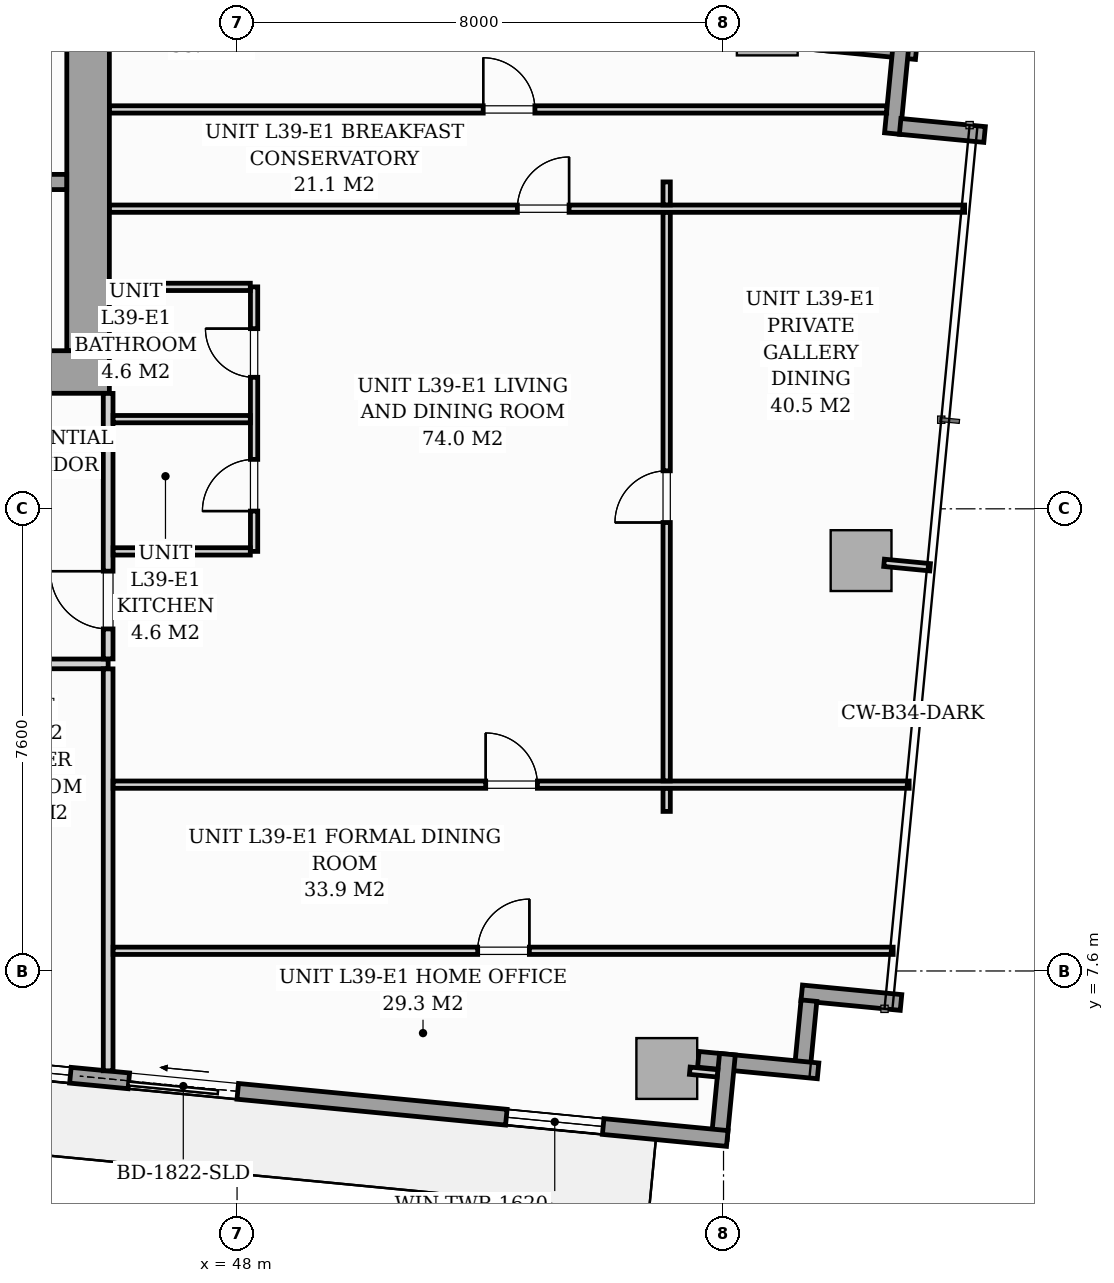
"""IFC4 building model, lengths in metres.
Left out: names, types, materials, properties, quantities, classifications, styles, units other than length and angle.
Written with IfcOpenShell. Run it as: python <this file> out.ifc"""

import sys

from ifc_helpers import new_model, si_unit, direction, frame, frame_2d, origin, origin_2d, place, context, subcontext, project, spatial, rectangle, i_section, extrude, source, transform, mapped, element, fill, save


model = new_model("IFC4")
c1 = context("Model", 3, precision=1e-05, world=origin(), true_north=direction((0.0, 1.0)))
c2 = subcontext(c1, "Body", "Model", "MODEL_VIEW")
j1 = project(units=[si_unit("LENGTHUNIT", "METRE"), si_unit("PLANEANGLEUNIT", "RADIAN")], contexts=[c1])
p1 = place(None, origin())
s1 = spatial("IfcSite", under=j1, at=p1, CompositionType="ELEMENT")
p2 = place(p1, origin())
s2 = spatial("IfcBuilding", under=s1, at=p2, CompositionType="ELEMENT")
p3 = place(p2, frame((0.0, 0.0, 137.4)))
s3 = spatial("IfcBuildingStorey", under=s2, at=p3, CompositionType="ELEMENT", Elevation=137.4)
m1 = source(origin(), c2, "Body", "SweptSolid", [
    extrude(i_section(OverallWidth=0.421, OverallDepth=0.465, WebThickness=0.045, FlangeThickness=0.073, FilletRadius=0.018, at=origin_2d()), origin(), (0.0, 0.0, 1.0), 3.196),
])
p4 = place(p3, frame((45.6, 17.4, 0.002), z_axis=(0.0, 0.0, 1.0), x_axis=(1.0, 0.0, 0.0)))
e1 = element("IfcColumn", 1, at=p4, inside=s3, PredefinedType="PILASTER", context=c2, shape_type="MappedRepresentation", body=[
    mapped(m1, transform((0.0, 0.0, 0.0), scale=1.0)),
])
m2 = source(origin(), c2, "Body", "SweptSolid", [
    extrude(rectangle(XDim=1.0, YDim=1.0, at=origin_2d()), origin(), (0.0, 0.0, 1.0), 3.196),
])
for number, where, z_axis, x_axis in (
    (2, (55.067, 5.996, 0.002), (0.0, 0.0, 1.0), (0.995, -0.096, 0.0)),
    (3, (56.719, 23.157, 0.002), (0.0, 0.0, 1.0), (0.995, -0.096, 0.0)),
    (4, (58.262, 14.348, 0.002), (0.0, 0.0, 1.0), (0.995, -0.096, 0.0)),
):
    element("IfcColumn", number, at=place(p3, frame(where, z_axis=z_axis, x_axis=x_axis)), inside=s3, PredefinedType="COLUMN", context=c2, shape_type="MappedRepresentation", body=[
        mapped(m2, transform((0.0, 0.0, 0.0), scale=1.0)),
    ])
p5 = place(p3, frame((57.2, 22.909, 0.0), z_axis=(0.0, 0.0, 1.0), x_axis=(0.995401789159, -0.095787672171, 0.0)))
e5 = element("IfcWall", 5, at=p5, inside=s3, PredefinedType="STANDARD", context=c2, shape_type="SweptSolid", body=[
    extrude(rectangle(XDim=1.978, YDim=0.26, at=frame_2d((0.989, 0.0))), origin(), (0.0, 0.0, 1.0), 2.94),
])
for number, where, z_axis, x_axis in (
    (6, (58.912, 22.76, 0.0), (0.0, 0.0, 1.0), (-0.096, -0.995, 0.0)),
    (7, (58.905, 21.49, 0.0), (0.0, 0.0, 1.0), (0.995, -0.096, 0.0)),
):
    element("IfcWall", number, at=place(p3, frame(where, z_axis=z_axis, x_axis=x_axis)), inside=s3, PredefinedType="STANDARD", context=c2, shape_type="SweptSolid", body=[
        extrude(rectangle(XDim=1.395, YDim=0.26, at=frame_2d((0.698, 0.0))), origin(), (0.0, 0.0, 1.0), 2.94),
    ])
p6 = place(p3, frame((58.919, 7.082, 0.0), z_axis=(0.0, 0.0, 1.0), x_axis=(-0.995393194909, 0.095876939504, 0.0)))
e8 = element("IfcWall", 8, at=p6, inside=s3, PredefinedType="STANDARD", context=c2, shape_type="SweptSolid", body=[
    extrude(rectangle(XDim=1.64, YDim=0.26, at=frame_2d((0.82, 0.0))), origin(), (0.0, 0.0, 1.0), 2.94),
])
p7 = place(p3, frame((57.405, 7.112, 0.0), z_axis=(0.0, 0.0, 1.0), x_axis=(-0.095971333708, -0.995384098279, 0.0)))
e9 = element("IfcWall", 9, at=p7, inside=s3, PredefinedType="STANDARD", context=c2, shape_type="SweptSolid", body=[
    extrude(rectangle(XDim=1.15, YDim=0.26, at=frame_2d((0.575, 0.0))), origin(), (0.0, 0.0, 1.0), 2.94),
])
p8 = place(p3, frame((57.555, 5.958, 0.0), z_axis=(0.0, 0.0, 1.0), x_axis=(-0.995401789159, 0.095787672171, 0.0)))
e10 = element("IfcWall", 10, at=p8, inside=s3, PredefinedType="STANDARD", context=c2, shape_type="SweptSolid", body=[
    extrude(rectangle(XDim=1.978, YDim=0.26, at=frame_2d((0.989, 0.0))), origin(), (0.0, 0.0, 1.0), 2.94),
])
p9 = place(p3, frame((56.064, 6.232, 0.0), z_axis=(0.0, 0.0, 1.0), x_axis=(-0.09589913835, -0.995391056452, 0.0)))
e11 = element("IfcWall", 11, at=p9, inside=s3, PredefinedType="STANDARD", context=c2, shape_type="SweptSolid", body=[
    extrude(rectangle(XDim=1.395, YDim=0.26, at=frame_2d((0.698, 0.0))), origin(), (0.0, 0.0, 1.0), 2.94),
])
p10 = place(p3, frame((56.061, 4.845, 0.0), z_axis=(0.0, 0.0, 1.0), x_axis=(-0.995395976631, 0.095848055311, 0.0)))
e12 = element("IfcWall", 12, at=p10, inside=s3, PredefinedType="STANDARD", context=c2, shape_type="SweptSolid", body=[
    extrude(rectangle(XDim=17.01, YDim=0.26, at=frame_2d((8.505, 0.0))), origin(), (0.0, 0.0, 1.0), 2.94),
])
p11 = place(p10, frame((8.087, 0.0, 0.0)))
e13 = element("IfcOpeningElement", 13, at=p11, cuts=e12, PredefinedType="OPENING", context=c2, shape_type="SweptSolid", body=[
    extrude(rectangle(XDim=1.8, YDim=2.06, at=frame_2d((0.9, 1.03))), frame((0.0, 0.14, 0.0), z_axis=(0.0, -1.0, 0.0), x_axis=(1.0, 0.0, 0.0)), (0.0, 0.0, 1.0), 0.28),
])
p12 = place(p10, frame((2.05, 0.0, 0.65)))
e14 = element("IfcOpeningElement", 14, at=p12, cuts=e12, PredefinedType="OPENING", context=c2, shape_type="SweptSolid", body=[
    extrude(rectangle(XDim=1.6, YDim=1.5, at=frame_2d((0.8, 0.75))), frame((0.0, 0.14, 0.0), z_axis=(0.0, -1.0, 0.0), x_axis=(1.0, 0.0, 0.0)), (0.0, 0.0, 1.0), 0.28),
])
p13 = place(p10, frame((10.852, 0.0, 0.75)))
e15 = element("IfcOpeningElement", 15, at=p13, cuts=e12, PredefinedType="OPENING", context=c2, shape_type="SweptSolid", body=[
    extrude(rectangle(XDim=1.6, YDim=1.5, at=frame_2d((0.8, 0.75))), frame((0.0, 0.14, 0.0), z_axis=(0.0, -1.0, 0.0), x_axis=(1.0, 0.0, 0.0)), (0.0, 0.0, 1.0), 0.28),
])
p14 = place(p3, frame((26.1, 17.45, 0.0), z_axis=(0.0, 0.0, 1.0), x_axis=(1.0, 0.0, 0.0)))
e16 = element("IfcWall", 16, at=p14, inside=s3, PredefinedType="SHEAR", context=c2, shape_type="SweptSolid", body=[
    extrude(rectangle(XDim=19.8, YDim=0.7, at=frame_2d((9.9, 0.0))), origin(), (0.0, 0.0, 1.0), 3.2),
])
p15 = place(p14, frame((1.05, 0.0, 0.0)))
e17 = element("IfcOpeningElement", 17, at=p15, cuts=e16, PredefinedType="OPENING", context=c2, shape_type="SweptSolid", body=[
    extrude(rectangle(XDim=0.95, YDim=2.06, at=frame_2d((0.475, 1.03))), frame((0.0, 0.36, 0.0), z_axis=(0.0, -1.0, 0.0), x_axis=(1.0, 0.0, 0.0)), (0.0, 0.0, 1.0), 0.72),
])
p16 = place(p14, frame((9.48, 0.0, 0.0)))
e18 = element("IfcOpeningElement", 18, at=p16, cuts=e16, PredefinedType="OPENING", context=c2, shape_type="SweptSolid", body=[
    extrude(rectangle(XDim=0.85, YDim=2.0, at=frame_2d((0.425, 1.0))), frame((0.0, 0.36, 0.0), z_axis=(0.0, -1.0, 0.0), x_axis=(1.0, 0.0, 0.0)), (0.0, 0.0, 1.0), 0.72),
])
p17 = place(p14, frame((17.65, 0.0, 0.0)))
e19 = element("IfcOpeningElement", 19, at=p17, cuts=e16, PredefinedType="OPENING", context=c2, shape_type="SweptSolid", body=[
    extrude(rectangle(XDim=0.95, YDim=2.06, at=frame_2d((0.475, 1.03))), frame((0.0, 0.36, 0.0), z_axis=(0.0, -1.0, 0.0), x_axis=(1.0, 0.0, 0.0)), (0.0, 0.0, 1.0), 0.72),
])
p18 = place(p3, frame((45.55, 17.802, 0.0), z_axis=(0.0, 0.0, 1.0), x_axis=(0.0, 1.0, 0.0)))
e20 = element("IfcWall", 20, at=p18, inside=s3, PredefinedType="SHEAR", context=c2, shape_type="SweptSolid", body=[
    extrude(rectangle(XDim=5.796, YDim=0.7, at=frame_2d((2.898, 0.0))), origin(), (0.0, 0.0, 1.0), 3.2),
])
p19 = place(p3, frame((37.05, 20.575, 0.0), z_axis=(0.0, 0.0, 1.0), x_axis=(1.0, 0.0, 0.0)))
e21 = element("IfcWall", 21, at=p19, inside=s3, PredefinedType="SOLIDWALL", context=c2, shape_type="SweptSolid", body=[
    extrude(rectangle(XDim=8.148, YDim=0.25, at=frame_2d((4.074, 0.0))), origin(), (0.0, 0.0, 1.0), 3.2),
])
p20 = place(p19, frame((6.6, 0.0, 0.0)))
e22 = element("IfcOpeningElement", 22, at=p20, cuts=e21, PredefinedType="OPENING", context=c2, shape_type="SweptSolid", body=[
    extrude(rectangle(XDim=0.95, YDim=2.06, at=frame_2d((0.475, 1.03))), frame((0.0, 0.135, 0.0), z_axis=(0.0, -1.0, 0.0), x_axis=(1.0, 0.0, 0.0)), (0.0, 0.0, 1.0), 0.27),
])
p21 = place(p3, frame((22.05, 12.65, 0.0), z_axis=(0.0, 0.0, 1.0), x_axis=(1.0, 0.0, 0.0)))
e23 = element("IfcWall", 23, at=p21, inside=s3, PredefinedType="PARTITIONING", context=c2, shape_type="SweptSolid", body=[
    extrude(rectangle(XDim=23.83, YDim=0.16, at=frame_2d((11.915, 0.0))), origin(), (0.0, 0.0, 1.0), 2.94),
])
p22 = place(p21, frame((3.0, 0.0, 0.0)))
e24 = element("IfcOpeningElement", 24, at=p22, cuts=e23, PredefinedType="OPENING", context=c2, shape_type="SweptSolid", body=[
    extrude(rectangle(XDim=0.95, YDim=2.06, at=frame_2d((0.475, 1.03))), frame((0.0, 0.09, 0.0), z_axis=(0.0, -1.0, 0.0), x_axis=(1.0, 0.0, 0.0)), (0.0, 0.0, 1.0), 0.18),
])
p23 = place(p21, frame((15.485, 0.0, 0.0)))
e25 = element("IfcOpeningElement", 25, at=p23, cuts=e23, PredefinedType="OPENING", context=c2, shape_type="SweptSolid", body=[
    extrude(rectangle(XDim=0.95, YDim=2.06, at=frame_2d((0.475, 1.03))), frame((0.0, 0.09, 0.0), z_axis=(0.0, -1.0, 0.0), x_axis=(1.0, 0.0, 0.0)), (0.0, 0.0, 1.0), 0.18),
])
p24 = place(p3, frame((45.88, 5.958, 0.0), z_axis=(0.0, 0.0, 1.0), x_axis=(0.0, 1.0, 0.0)))
e26 = element("IfcWall", 26, at=p24, inside=s3, PredefinedType="PARTITIONING", context=c2, shape_type="SweptSolid", body=[
    extrude(rectangle(XDim=6.61, YDim=0.16, at=frame_2d((3.305, 0.0))), origin(), (0.0, 0.0, 1.0), 2.94),
])
p25 = place(p3, frame((45.88, 12.732, 0.0), z_axis=(0.0, 0.0, 1.0), x_axis=(0.0, 1.0, 0.0)))
e27 = element("IfcWall", 27, at=p25, inside=s3, PredefinedType="PARTITIONING", context=c2, shape_type="SweptSolid", body=[
    extrude(rectangle(XDim=4.366, YDim=0.16, at=frame_2d((2.183, 0.0))), origin(), (0.0, 0.0, 1.0), 2.94),
])
p26 = place(p25, frame((0.493, 0.0, 0.0)))
e28 = element("IfcOpeningElement", 28, at=p26, cuts=e27, PredefinedType="OPENING", context=c2, shape_type="SweptSolid", body=[
    extrude(rectangle(XDim=0.95, YDim=2.06, at=frame_2d((0.475, 1.03))), frame((0.0, 0.09, 0.0), z_axis=(0.0, -1.0, 0.0), x_axis=(1.0, 0.0, 0.0)), (0.0, 0.0, 1.0), 0.18),
])
p27 = place(p3, frame((48.28, 14.5, 0.0), z_axis=(0.0, 0.0, 1.0), x_axis=(0.0, 1.0, 0.0)))
e29 = element("IfcWall", 29, at=p27, inside=s3, PredefinedType="PARTITIONING", context=c2, shape_type="SweptSolid", body=[
    extrude(rectangle(XDim=4.35, YDim=0.12, at=frame_2d((2.175, 0.0))), origin(), (0.0, 0.0, 1.0), 2.94),
])
p28 = place(p27, frame((0.663, 0.0, 0.0)))
e30 = element("IfcOpeningElement", 30, at=p28, cuts=e29, PredefinedType="OPENING", context=c2, shape_type="SweptSolid", body=[
    extrude(rectangle(XDim=0.85, YDim=2.05, at=frame_2d((0.425, 1.025))), frame((0.0, 0.07, 0.0), z_axis=(0.0, -1.0, 0.0), x_axis=(1.0, 0.0, 0.0)), (0.0, 0.0, 1.0), 0.14),
])
p29 = place(p27, frame((2.863, 0.0, 0.0)))
e31 = element("IfcOpeningElement", 31, at=p29, cuts=e29, PredefinedType="OPENING", context=c2, shape_type="SweptSolid", body=[
    extrude(rectangle(XDim=0.8, YDim=2.02, at=frame_2d((0.4, 1.01))), frame((0.0, 0.07, 0.0), z_axis=(0.0, -1.0, 0.0), x_axis=(1.0, 0.0, 0.0)), (0.0, 0.0, 1.0), 0.14),
])
p30 = place(p3, frame((45.962, 16.675, 0.0), z_axis=(0.0, 0.0, 1.0), x_axis=(1.0, 0.0, 0.0)))
e32 = element("IfcWall", 32, at=p30, inside=s3, PredefinedType="PARTITIONING", context=c2, shape_type="SweptSolid", body=[
    extrude(rectangle(XDim=2.256, YDim=0.12, at=frame_2d((1.128, 0.0))), origin(), (0.0, 0.0, 1.0), 2.063),
])
p31 = place(p3, frame((45.962, 14.5, 0.0), z_axis=(0.0, 0.0, 1.0), x_axis=(1.0, 0.0, 0.0)))
e33 = element("IfcWall", 33, at=p31, inside=s3, PredefinedType="PARTITIONING", context=c2, shape_type="SweptSolid", body=[
    extrude(rectangle(XDim=2.256, YDim=0.12, at=frame_2d((1.128, 0.0))), origin(), (0.0, 0.0, 1.0), 2.94),
])
p32 = place(p3, frame((45.902, 18.85, 0.0), z_axis=(0.0, 0.0, 1.0), x_axis=(1.0, 0.0, 0.0)))
e34 = element("IfcWall", 34, at=p32, inside=s3, PredefinedType="PARTITIONING", context=c2, shape_type="SweptSolid", body=[
    extrude(rectangle(XDim=2.316, YDim=0.12, at=frame_2d((1.158, 0.0))), origin(), (0.0, 0.0, 1.0), 2.94),
])
p33 = place(p3, frame((45.902, 21.768, 0.0), z_axis=(0.0, 0.0, 1.0), x_axis=(1.0, 0.0, 0.0)))
e35 = element("IfcWall", 35, at=p33, inside=s3, PredefinedType="PARTITIONING", context=c2, shape_type="SweptSolid", body=[
    extrude(rectangle(XDim=12.781, YDim=0.12, at=frame_2d((6.391, 0.0))), origin(), (0.0, 0.0, 1.0), 2.94),
])
p34 = place(p33, frame((6.146, 0.0, 0.0)))
e36 = element("IfcOpeningElement", 36, at=p34, cuts=e35, PredefinedType="OPENING", context=c2, shape_type="SweptSolid", body=[
    extrude(rectangle(XDim=0.85, YDim=2.05, at=frame_2d((0.425, 1.025))), frame((0.0, 0.07, 0.0), z_axis=(0.0, -1.0, 0.0), x_axis=(1.0, 0.0, 0.0)), (0.0, 0.0, 1.0), 0.14),
])
p35 = place(p3, frame((45.962, 7.932, 0.0), z_axis=(0.0, 0.0, 1.0), x_axis=(1.0, 0.0, 0.0)))
e37 = element("IfcWall", 37, at=p35, inside=s3, PredefinedType="PARTITIONING", context=c2, shape_type="SweptSolid", body=[
    extrude(rectangle(XDim=12.828, YDim=0.12, at=frame_2d((6.414, 0.0))), origin(), (0.0, 0.0, 1.0), 2.94),
])
p36 = place(p35, frame((5.995, 0.0, 0.0)))
e38 = element("IfcOpeningElement", 38, at=p36, cuts=e37, PredefinedType="OPENING", context=c2, shape_type="SweptSolid", body=[
    extrude(rectangle(XDim=0.85, YDim=2.05, at=frame_2d((0.425, 1.025))), frame((0.0, 0.07, 0.0), z_axis=(0.0, -1.0, 0.0), x_axis=(1.0, 0.0, 0.0)), (0.0, 0.0, 1.0), 0.14),
])
p37 = place(p3, frame((45.962, 10.664, 0.0), z_axis=(0.0, 0.0, 1.0), x_axis=(1.0, 0.0, 0.0)))
e39 = element("IfcWall", 39, at=p37, inside=s3, PredefinedType="PARTITIONING", context=c2, shape_type="SweptSolid", body=[
    extrude(rectangle(XDim=13.091, YDim=0.12, at=frame_2d((6.545, 0.0))), origin(), (0.0, 0.0, 1.0), 2.94),
])
p38 = place(p37, frame((6.127, 0.0, 0.0)))
e40 = element("IfcOpeningElement", 40, at=p38, cuts=e39, PredefinedType="OPENING", context=c2, shape_type="SweptSolid", body=[
    extrude(rectangle(XDim=0.85, YDim=2.05, at=frame_2d((0.425, 1.025))), frame((0.0, 0.07, 0.0), z_axis=(0.0, -1.0, 0.0), x_axis=(1.0, 0.0, 0.0)), (0.0, 0.0, 1.0), 0.14),
])
p39 = place(p3, frame((45.902, 20.136, 0.0), z_axis=(0.0, 0.0, 1.0), x_axis=(1.0, 0.0, 0.0)))
e41 = element("IfcWall", 41, at=p39, inside=s3, PredefinedType="PARTITIONING", context=c2, shape_type="SweptSolid", body=[
    extrude(rectangle(XDim=14.063, YDim=0.12, at=frame_2d((7.031, 0.0))), origin(), (0.0, 0.0, 1.0), 2.94),
])
p40 = place(p39, frame((6.708, 0.0, 0.0)))
e42 = element("IfcOpeningElement", 42, at=p40, cuts=e41, PredefinedType="OPENING", context=c2, shape_type="SweptSolid", body=[
    extrude(rectangle(XDim=0.85, YDim=2.05, at=frame_2d((0.425, 1.025))), frame((0.0, 0.07, 0.0), z_axis=(0.0, -1.0, 0.0), x_axis=(1.0, 0.0, 0.0)), (0.0, 0.0, 1.0), 0.14),
])
p41 = place(p3, frame((55.065, 10.224, 0.0), z_axis=(0.0, 0.0, 1.0), x_axis=(0.0, 1.0, 0.0)))
e43 = element("IfcWall", 43, at=p41, inside=s3, PredefinedType="PARTITIONING", context=c2, shape_type="SweptSolid", body=[
    extrude(rectangle(XDim=0.378, YDim=0.12, at=frame_2d((0.189, 0.0))), origin(), (0.0, 0.0, 1.0), 2.94),
])
p42 = place(p3, frame((55.065, 10.726, 0.0), z_axis=(0.0, 0.0, 1.0), x_axis=(0.0, 1.0, 0.0)))
e44 = element("IfcWall", 44, at=p42, inside=s3, PredefinedType="PARTITIONING", context=c2, shape_type="SweptSolid", body=[
    extrude(rectangle(XDim=9.348, YDim=0.12, at=frame_2d((4.674, 0.0))), origin(), (0.0, 0.0, 1.0), 2.94),
])
p43 = place(p42, frame((4.249, 0.0, 0.0)))
e45 = element("IfcOpeningElement", 45, at=p43, cuts=e44, PredefinedType="OPENING", context=c2, shape_type="SweptSolid", body=[
    extrude(rectangle(XDim=0.85, YDim=2.05, at=frame_2d((0.425, 1.025))), frame((0.0, 0.07, 0.0), z_axis=(0.0, -1.0, 0.0), x_axis=(1.0, 0.0, 0.0)), (0.0, 0.0, 1.0), 0.14),
])
p44 = place(p3, frame((55.065, 20.198, 0.0), z_axis=(0.0, 0.0, 1.0), x_axis=(0.0, 1.0, 0.0)))
e46 = element("IfcWall", 46, at=p44, inside=s3, PredefinedType="PARTITIONING", context=c2, shape_type="SweptSolid", body=[
    extrude(rectangle(XDim=0.378, YDim=0.12, at=frame_2d((0.189, 0.0))), origin(), (0.0, 0.0, 1.0), 2.94),
])
p45 = place(p3, frame((55.445, 5.96, 0.0), z_axis=(0.0, 0.0, 1.0), x_axis=(0.995384576284, -0.09596637586, 0.0)))
e47 = element("IfcWall", 47, at=p45, inside=s3, PredefinedType="PARTITIONING", context=c2, shape_type="SweptSolid", body=[
    extrude(rectangle(XDim=0.458, YDim=0.12, at=frame_2d((0.229, 0.0))), origin(), (0.0, 0.0, 1.0), 2.94),
])
p46 = place(p3, frame((58.64, 14.312, 0.0), z_axis=(0.0, 0.0, 1.0), x_axis=(0.995377786728, -0.096036772582, 0.0)))
e48 = element("IfcWall", 48, at=p46, inside=s3, PredefinedType="PARTITIONING", context=c2, shape_type="SweptSolid", body=[
    extrude(rectangle(XDim=0.76, YDim=0.12, at=frame_2d((0.38, 0.0))), origin(), (0.0, 0.0, 1.0), 2.94),
])
m3 = source(origin(), c2, "Body", "SweptSolid", [
    extrude(rectangle(XDim=1.8, YDim=2.06, at=frame_2d((0.9, 1.03))), frame((0.0, 0.025, 0.0), z_axis=(0.0, -1.0, 0.0), x_axis=(1.0, 0.0, 0.0)), (0.0, 0.0, 1.0), 0.05),
])
p47 = place(p11, origin())
e49 = element("IfcDoor", 49, at=p47, inside=s3, OperationType="SLIDING_TO_RIGHT", PredefinedType="DOOR", context=c2, shape_type="MappedRepresentation", body=[
    mapped(m3, transform((0.0, 0.0, 0.0), scale=1.0)),
])
fill(e13, e49)
m4 = source(origin(), c2, "Body", "SweptSolid", [
    extrude(rectangle(XDim=1.6, YDim=1.5, at=frame_2d((0.8, 0.75))), frame((0.0, 0.03, 0.0), z_axis=(0.0, -1.0, 0.0), x_axis=(1.0, 0.0, 0.0)), (0.0, 0.0, 1.0), 0.06),
])
p48 = place(p12, origin())
e50 = element("IfcWindow", 50, at=p48, inside=s3, PartitioningType="SINGLE_PANEL", PredefinedType="WINDOW", context=c2, shape_type="MappedRepresentation", body=[
    mapped(m4, transform((0.0, 0.0, 0.0), scale=1.0)),
])
fill(e14, e50)
p49 = place(p13, origin())
e51 = element("IfcWindow", 51, at=p49, inside=s3, PartitioningType="SINGLE_PANEL", PredefinedType="WINDOW", context=c2, shape_type="MappedRepresentation", body=[
    mapped(m4, transform((0.0, 0.0, 0.0), scale=1.0)),
])
fill(e15, e51)
m5 = source(origin(), c2, "Body", "SweptSolid", [
    extrude(rectangle(XDim=0.95, YDim=2.06, at=frame_2d((0.475, 1.03))), frame((0.0, 0.025, 0.0), z_axis=(0.0, -1.0, 0.0), x_axis=(1.0, 0.0, 0.0)), (0.0, 0.0, 1.0), 0.05),
])
p50 = place(p26, origin())
e52 = element("IfcDoor", 52, at=p50, inside=s3, OperationType="SINGLE_SWING_RIGHT", PredefinedType="DOOR", context=c2, shape_type="MappedRepresentation", body=[
    mapped(m5, transform((0.0, 0.0, 0.0), scale=1.0)),
])
fill(e28, e52)
m6 = source(origin(), c2, "Body", "SweptSolid", [
    extrude(rectangle(XDim=0.85, YDim=2.05, at=frame_2d((0.425, 1.025))), frame((0.0, 0.025, 0.0), z_axis=(0.0, -1.0, 0.0), x_axis=(1.0, 0.0, 0.0)), (0.0, 0.0, 1.0), 0.05),
])
p51 = place(p28, origin())
e53 = element("IfcDoor", 53, at=p51, inside=s3, OperationType="SINGLE_SWING_LEFT", PredefinedType="DOOR", context=c2, shape_type="MappedRepresentation", body=[
    mapped(m6, transform((0.0, 0.0, 0.0), scale=1.0)),
])
fill(e30, e53)
m7 = source(origin(), c2, "Body", "SweptSolid", [
    extrude(rectangle(XDim=0.8, YDim=2.02, at=frame_2d((0.4, 1.01))), frame((0.0, 0.025, 0.0), z_axis=(0.0, -1.0, 0.0), x_axis=(1.0, 0.0, 0.0)), (0.0, 0.0, 1.0), 0.05),
])
p52 = place(p29, origin())
e54 = element("IfcDoor", 54, at=p52, inside=s3, OperationType="SINGLE_SWING_RIGHT", PredefinedType="DOOR", context=c2, shape_type="MappedRepresentation", body=[
    mapped(m7, transform((0.0, 0.0, 0.0), scale=1.0)),
])
fill(e31, e54)
p53 = place(p34, origin())
e55 = element("IfcDoor", 55, at=p53, inside=s3, OperationType="SINGLE_SWING_LEFT", PredefinedType="DOOR", context=c2, shape_type="MappedRepresentation", body=[
    mapped(m6, transform((0.0, 0.0, 0.0), scale=1.0)),
])
fill(e36, e55)
p54 = place(p36, origin())
e56 = element("IfcDoor", 56, at=p54, inside=s3, OperationType="SINGLE_SWING_RIGHT", PredefinedType="DOOR", context=c2, shape_type="MappedRepresentation", body=[
    mapped(m6, transform((0.0, 0.0, 0.0), scale=1.0)),
])
fill(e38, e56)
p55 = place(p38, origin())
e57 = element("IfcDoor", 57, at=p55, inside=s3, OperationType="SINGLE_SWING_LEFT", PredefinedType="DOOR", context=c2, shape_type="MappedRepresentation", body=[
    mapped(m6, transform((0.0, 0.0, 0.0), scale=1.0)),
])
fill(e40, e57)
p56 = place(p40, origin())
e58 = element("IfcDoor", 58, at=p56, inside=s3, OperationType="SINGLE_SWING_RIGHT", PredefinedType="DOOR", context=c2, shape_type="MappedRepresentation", body=[
    mapped(m6, transform((0.0, 0.0, 0.0), scale=1.0)),
])
fill(e42, e58)
p57 = place(p43, origin())
e59 = element("IfcDoor", 59, at=p57, inside=s3, OperationType="SINGLE_SWING_LEFT", PredefinedType="DOOR", context=c2, shape_type="MappedRepresentation", body=[
    mapped(m6, transform((0.0, 0.0, 0.0), scale=1.0)),
])
fill(e45, e59)
save(model, sys.argv[1])
